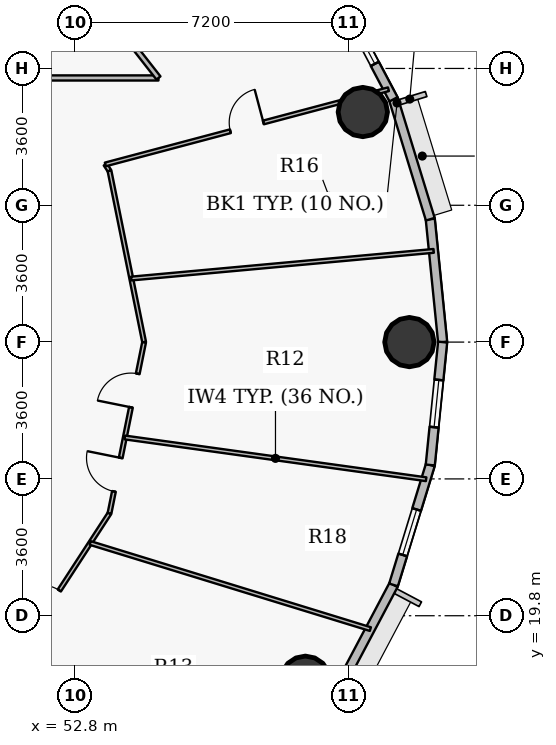
"""IFC4 building model, lengths in metres.
Left out: names, types, materials, properties, quantities, classifications, styles, units other than length and angle.
Written with IfcOpenShell. Run it as: python <this file> out.ifc"""

import sys

from ifc_helpers import new_model, si_unit, direction, frame, frame_2d, origin, origin_2d, place, context, subcontext, project, spatial, rectangle, hollow_circle, extrude, source, transform, mapped, element, fill, save


model = new_model("IFC4")
c1 = context("Model", 3, precision=1e-05, world=origin(), true_north=direction((0.0, 1.0)))
c2 = subcontext(c1, "Body", "Model", "MODEL_VIEW")
j1 = project(units=[si_unit("LENGTHUNIT", "METRE"), si_unit("PLANEANGLEUNIT", "RADIAN")], contexts=[c1])
p1 = place(None, origin())
s1 = spatial("IfcSite", under=j1, at=p1, CompositionType="ELEMENT")
p2 = place(p1, origin())
s2 = spatial("IfcBuilding", under=s1, at=p2, CompositionType="ELEMENT")
p3 = place(p2, frame((0.0, 0.0, 186.15)))
s3 = spatial("IfcBuildingStorey", under=s2, at=p3, CompositionType="ELEMENT", Elevation=186.15)
for number, where, z_axis, x_axis in (
    (1, (61.6, 27.0, 0.0), (0.0, 0.0, 1.0), (1.0, 0.0, 0.0)),
    (2, (60.375, 33.053, 0.0), (0.0, 0.0, 1.0), (1.0, 0.0, 0.0)),
    (3, (58.863, 18.089, 0.0), (0.0, 0.0, 1.0), (1.0, 0.0, 0.0)),
):
    element("IfcColumn", number, at=place(p3, frame(where, z_axis=z_axis, x_axis=x_axis)), inside=s3, PredefinedType="COLUMN", context=c2, shape_type="SweptSolid", body=[
        extrude(hollow_circle(Radius=0.65, WallThickness=0.04, at=origin_2d()), origin(), (0.0, 0.0, 1.0), 3.75),
    ])
p4 = place(p3, frame((62.15, 30.234, 0.0), z_axis=(0.0, 0.0, 1.0), x_axis=(0.100061534614, -0.994981250723, 0.0)))
e4 = element("IfcWall", 4, at=p4, inside=s3, PredefinedType="SOLIDWALL", context=c2, shape_type="SweptSolid", body=[
    extrude(rectangle(XDim=3.25, YDim=0.24, at=frame_2d((1.625, 0.0))), origin(), (0.0, 0.0, 1.0), 3.5),
])
p5 = place(p3, frame((61.183, 33.389, 0.0), z_axis=(0.0, 0.0, 1.0), x_axis=(0.293097995113, -0.956082405058, 0.0)))
e5 = element("IfcWall", 5, at=p5, inside=s3, PredefinedType="SOLIDWALL", context=c2, shape_type="SweptSolid", body=[
    extrude(rectangle(XDim=3.3, YDim=0.24, at=frame_2d((1.65, 0.0))), origin(), (0.0, 0.0, 1.0), 3.5),
])
p6 = place(p3, frame((59.596, 36.388, 0.0), z_axis=(0.0, 0.0, 1.0), x_axis=(0.467586874938, -0.88394712194, 0.0)))
e6 = element("IfcWall", 6, at=p6, inside=s3, PredefinedType="SOLIDWALL", context=c2, shape_type="SweptSolid", body=[
    extrude(rectangle(XDim=3.393, YDim=0.24, at=frame_2d((1.697, 0.0))), origin(), (0.0, 0.0, 1.0), 3.5),
])
p7 = place(p6, frame((0.739, 0.0, 0.9)))
e7 = element("IfcOpeningElement", 7, at=p7, cuts=e6, PredefinedType="OPENING", context=c2, shape_type="SweptSolid", body=[
    extrude(rectangle(XDim=1.6, YDim=1.75, at=origin_2d()), frame((0.8, 0.13, 0.875), z_axis=(0.0, -1.0, 0.0), x_axis=(1.0, 0.0, 0.0)), (0.0, 0.0, 1.0), 0.26),
])
p8 = place(p3, frame((61.183, 20.611, 0.0), z_axis=(0.0, 0.0, 1.0), x_axis=(-0.467586874938, -0.88394712194, 0.0)))
e8 = element("IfcWall", 8, at=p8, inside=s3, PredefinedType="SOLIDWALL", context=c2, shape_type="SweptSolid", body=[
    extrude(rectangle(XDim=3.393, YDim=0.24, at=frame_2d((1.697, 0.0))), origin(), (0.0, 0.0, 1.0), 3.5),
])
p9 = place(p3, frame((62.15, 23.766, 0.0), z_axis=(0.0, 0.0, 1.0), x_axis=(-0.293097995113, -0.956082405058, 0.0)))
e9 = element("IfcWall", 9, at=p9, inside=s3, PredefinedType="SOLIDWALL", context=c2, shape_type="SweptSolid", body=[
    extrude(rectangle(XDim=3.3, YDim=0.24, at=frame_2d((1.65, 0.0))), origin(), (0.0, 0.0, 1.0), 3.5),
])
p10 = place(p9, frame((1.225, 0.0, 0.9)))
e10 = element("IfcOpeningElement", 10, at=p10, cuts=e9, PredefinedType="OPENING", context=c2, shape_type="SweptSolid", body=[
    extrude(rectangle(XDim=1.25, YDim=1.65, at=origin_2d()), frame((0.625, 0.13, 0.825), z_axis=(0.0, -1.0, 0.0), x_axis=(1.0, 0.0, 0.0)), (0.0, 0.0, 1.0), 0.26),
])
p11 = place(p3, frame((62.475, 27.0, 0.0), z_axis=(0.0, 0.0, 1.0), x_axis=(-0.100061534614, -0.994981250723, 0.0)))
e11 = element("IfcWall", 11, at=p11, inside=s3, PredefinedType="SOLIDWALL", context=c2, shape_type="SweptSolid", body=[
    extrude(rectangle(XDim=3.25, YDim=0.24, at=frame_2d((1.625, 0.0))), origin(), (0.0, 0.0, 1.0), 3.5),
])
p12 = place(p11, frame((1.0, 0.0, 0.9)))
e12 = element("IfcOpeningElement", 12, at=p12, cuts=e11, PredefinedType="OPENING", context=c2, shape_type="SweptSolid", body=[
    extrude(rectangle(XDim=1.25, YDim=1.65, at=origin_2d()), frame((0.625, 0.13, 0.825), z_axis=(0.0, -1.0, 0.0), x_axis=(1.0, 0.0, 0.0)), (0.0, 0.0, 1.0), 0.26),
])
p13 = place(p3, frame((45.8, 33.95, 0.0), z_axis=(0.0, 0.0, 1.0), x_axis=(1.0, 0.0, 0.0)))
e13 = element("IfcWall", 13, at=p13, inside=s3, PredefinedType="PARTITIONING", context=c2, shape_type="SweptSolid", body=[
    extrude(rectangle(XDim=9.197, YDim=0.135, at=frame_2d((4.599, 0.0))), origin(), (0.0, 0.0, 1.0), 3.185),
])
p14 = place(p13, frame((4.098, 0.0, 0.0)))
e14 = element("IfcOpeningElement", 14, at=p14, cuts=e13, PredefinedType="OPENING", context=c2, shape_type="SweptSolid", body=[
    extrude(rectangle(XDim=1.0, YDim=2.15, at=origin_2d()), frame((0.5, 0.078, 1.075), z_axis=(0.0, -1.0, 0.0), x_axis=(1.0, 0.0, 0.0)), (0.0, 0.0, 1.0), 0.155),
])
p15 = place(p3, frame((51.064, 18.429, 0.0), z_axis=(0.0, 0.0, 1.0), x_axis=(0.545382906853, 0.838187022634, 0.0)))
e15 = element("IfcWall", 15, at=p15, inside=s3, PredefinedType="PARTITIONING", context=c2, shape_type="SweptSolid", body=[
    extrude(rectangle(XDim=4.849, YDim=0.1, at=frame_2d((2.425, 0.0))), origin(), (0.0, 0.0, 1.0), 2.935),
])
p16 = place(p15, frame((1.529, 0.0, 0.0)))
e16 = element("IfcOpeningElement", 16, at=p16, cuts=e15, PredefinedType="OPENING", context=c2, shape_type="SweptSolid", body=[
    extrude(rectangle(XDim=0.9, YDim=2.1, at=origin_2d()), frame((0.45, 0.06, 1.05), z_axis=(0.0, -1.0, 0.0), x_axis=(1.0, 0.0, 0.0)), (0.0, 0.0, 1.0), 0.12),
])
p17 = place(p3, frame((53.201, 21.714, 0.0), z_axis=(0.0, 0.0, 1.0), x_axis=(0.955880247412, -0.293756621386, 0.0)))
e17 = element("IfcWall", 17, at=p17, inside=s3, PredefinedType="PARTITIONING", context=c2, shape_type="SweptSolid", body=[
    extrude(rectangle(XDim=7.713, YDim=0.1, at=frame_2d((3.856, 0.0))), origin(), (0.0, 0.0, 1.0), 2.935),
])
p18 = place(p3, frame((53.599, 31.674, 0.0), z_axis=(0.0, 0.0, 1.0), x_axis=(0.545415251213, -0.838165976251, 0.0)))
e18 = element("IfcWall", 18, at=p18, inside=s3, PredefinedType="PARTITIONING", context=c2, shape_type="SweptSolid", body=[
    extrude(rectangle(XDim=0.201, YDim=0.1, at=frame_2d((0.101, 0.0))), origin(), (0.0, 0.0, 1.0), 2.935),
])
p19 = place(p3, frame((53.599, 31.674, 0.0), z_axis=(0.0, 0.0, 1.0), x_axis=(0.966493108364, 0.256692562193, 0.0)))
e19 = element("IfcWall", 19, at=p19, inside=s3, PredefinedType="PARTITIONING", context=c2, shape_type="SweptSolid", body=[
    extrude(rectangle(XDim=7.708, YDim=0.1, at=frame_2d((3.854, 0.0))), origin(), (0.0, 0.0, 1.0), 2.935),
])
p20 = place(p19, frame((3.404, 0.0, 0.0)))
e20 = element("IfcOpeningElement", 20, at=p20, cuts=e19, PredefinedType="OPENING", context=c2, shape_type="SweptSolid", body=[
    extrude(rectangle(XDim=0.9, YDim=2.1, at=origin_2d()), frame((0.45, 0.06, 1.05), z_axis=(0.0, -1.0, 0.0), x_axis=(1.0, 0.0, 0.0)), (0.0, 0.0, 1.0), 0.12),
])
p21 = place(p3, frame((53.653, 35.667, 0.0), z_axis=(0.0, 0.0, 1.0), x_axis=(0.616302223209, -0.787509726713, 0.0)))
e21 = element("IfcWall", 21, at=p21, inside=s3, PredefinedType="PARTITIONING", context=c2, shape_type="SweptSolid", body=[
    extrude(rectangle(XDim=2.18, YDim=0.135, at=frame_2d((1.09, 0.0))), origin(), (0.0, 0.0, 1.0), 3.5),
])
p22 = place(p3, frame((53.709, 22.494, 0.0), z_axis=(0.0, 0.0, 1.0), x_axis=(0.19825018224, 0.980151450155, 0.0)))
e22 = element("IfcWall", 22, at=p22, inside=s3, PredefinedType="PARTITIONING", context=c2, shape_type="SweptSolid", body=[
    extrude(rectangle(XDim=4.597, YDim=0.1, at=frame_2d((2.299, 0.0))), origin(), (0.0, 0.0, 1.0), 2.935),
])
p23 = place(p22, frame((0.588, 0.0, 0.0)))
e23 = element("IfcOpeningElement", 23, at=p23, cuts=e22, PredefinedType="OPENING", context=c2, shape_type="SweptSolid", body=[
    extrude(rectangle(XDim=0.9, YDim=2.1, at=origin_2d()), frame((0.45, 0.06, 1.05), z_axis=(0.0, -1.0, 0.0), x_axis=(1.0, 0.0, 0.0)), (0.0, 0.0, 1.0), 0.12),
])
p24 = place(p22, frame((2.847, 0.0, 0.0)))
e24 = element("IfcOpeningElement", 24, at=p24, cuts=e22, PredefinedType="OPENING", context=c2, shape_type="SweptSolid", body=[
    extrude(rectangle(XDim=0.9, YDim=2.1, at=origin_2d()), frame((0.45, 0.06, 1.05), z_axis=(0.0, -1.0, 0.0), x_axis=(1.0, 0.0, 0.0)), (0.0, 0.0, 1.0), 0.12),
])
p25 = place(p3, frame((53.709, 31.506, 0.0), z_axis=(0.0, 0.0, 1.0), x_axis=(0.198209478932, -0.980159682124, 0.0)))
e25 = element("IfcWall", 25, at=p25, inside=s3, PredefinedType="PARTITIONING", context=c2, shape_type="SweptSolid", body=[
    extrude(rectangle(XDim=4.597, YDim=0.1, at=frame_2d((2.298, 0.0))), origin(), (0.0, 0.0, 1.0), 2.935),
])
p26 = place(p3, frame((54.112, 24.49, 0.0), z_axis=(0.0, 0.0, 1.0), x_axis=(0.990538514902, -0.137235019202, 0.0)))
e26 = element("IfcWall", 26, at=p26, inside=s3, PredefinedType="PARTITIONING", context=c2, shape_type="SweptSolid", body=[
    extrude(rectangle(XDim=8.004, YDim=0.1, at=frame_2d((4.002, 0.0))), origin(), (0.0, 0.0, 1.0), 2.935),
])
p27 = place(p3, frame((54.282, 28.672, 0.0), z_axis=(0.0, 0.0, 1.0), x_axis=(0.995843216122, 0.091083966227, 0.0)))
e27 = element("IfcWall", 27, at=p27, inside=s3, PredefinedType="PARTITIONING", context=c2, shape_type="SweptSolid", body=[
    extrude(rectangle(XDim=7.99, YDim=0.1, at=frame_2d((3.995, 0.0))), origin(), (0.0, 0.0, 1.0), 2.935),
])
m1 = source(origin(), c2, "Body", "SweptSolid", [
    extrude(rectangle(XDim=1.6, YDim=1.75, at=origin_2d()), frame((0.8, 0.03, 0.875), z_axis=(0.0, -1.0, 0.0), x_axis=(1.0, 0.0, 0.0)), (0.0, 0.0, 1.0), 0.06),
])
p28 = place(p7, origin())
e28 = element("IfcWindow", 28, at=p28, inside=s3, PartitioningType="DOUBLE_PANEL_VERTICAL", PredefinedType="WINDOW", context=c2, shape_type="MappedRepresentation", body=[
    mapped(m1, transform((0.0, 0.0, 0.0), x_axis=(1.0, 0.0, 0.0), y_axis=(0.0, 1.0, 0.0), z_axis=(0.0, 0.0, 1.0), scale=1.0)),
])
fill(e7, e28)
m2 = source(origin(), c2, "Body", "SweptSolid", [
    extrude(rectangle(XDim=1.25, YDim=1.65, at=origin_2d()), frame((0.625, 0.03, 0.825), z_axis=(0.0, -1.0, 0.0), x_axis=(1.0, 0.0, 0.0)), (0.0, 0.0, 1.0), 0.06),
])
p29 = place(p10, origin())
e29 = element("IfcWindow", 29, at=p29, inside=s3, PartitioningType="SINGLE_PANEL", PredefinedType="WINDOW", context=c2, shape_type="MappedRepresentation", body=[
    mapped(m2, transform((0.0, 0.0, 0.0), x_axis=(1.0, 0.0, 0.0), y_axis=(0.0, 1.0, 0.0), z_axis=(0.0, 0.0, 1.0), scale=1.0)),
])
fill(e10, e29)
p30 = place(p12, origin())
e30 = element("IfcWindow", 30, at=p30, inside=s3, PartitioningType="SINGLE_PANEL", PredefinedType="WINDOW", context=c2, shape_type="MappedRepresentation", body=[
    mapped(m2, transform((0.0, 0.0, 0.0), x_axis=(1.0, 0.0, 0.0), y_axis=(0.0, 1.0, 0.0), z_axis=(0.0, 0.0, 1.0), scale=1.0)),
])
fill(e12, e30)
m3 = source(origin(), c2, "Body", "SweptSolid", [
    extrude(rectangle(XDim=0.9, YDim=2.1, at=origin_2d()), frame((0.45, 0.025, 1.05), z_axis=(0.0, -1.0, 0.0), x_axis=(1.0, 0.0, 0.0)), (0.0, 0.0, 1.0), 0.05),
])
p31 = place(p16, origin())
e31 = element("IfcDoor", 31, at=p31, inside=s3, OperationType="SINGLE_SWING_LEFT", PredefinedType="DOOR", context=c2, shape_type="MappedRepresentation", body=[
    mapped(m3, transform((0.0, 0.0, 0.0), x_axis=(1.0, 0.0, 0.0), y_axis=(0.0, 1.0, 0.0), z_axis=(0.0, 0.0, 1.0), scale=1.0)),
])
fill(e16, e31)
p32 = place(p23, origin())
e32 = element("IfcDoor", 32, at=p32, inside=s3, OperationType="SINGLE_SWING_RIGHT", PredefinedType="DOOR", context=c2, shape_type="MappedRepresentation", body=[
    mapped(m3, transform((0.0, 0.0, 0.0), x_axis=(1.0, 0.0, 0.0), y_axis=(0.0, 1.0, 0.0), z_axis=(0.0, 0.0, 1.0), scale=1.0)),
])
fill(e23, e32)
p33 = place(p24, origin())
e33 = element("IfcDoor", 33, at=p33, inside=s3, OperationType="SINGLE_SWING_LEFT", PredefinedType="DOOR", context=c2, shape_type="MappedRepresentation", body=[
    mapped(m3, transform((0.0, 0.0, 0.0), x_axis=(1.0, 0.0, 0.0), y_axis=(0.0, 1.0, 0.0), z_axis=(0.0, 0.0, 1.0), scale=1.0)),
])
fill(e24, e33)
p34 = place(p20, origin())
e34 = element("IfcDoor", 34, at=p34, inside=s3, OperationType="SINGLE_SWING_RIGHT", PredefinedType="DOOR", context=c2, shape_type="MappedRepresentation", body=[
    mapped(m3, transform((0.0, 0.0, 0.0), x_axis=(1.0, 0.0, 0.0), y_axis=(0.0, 1.0, 0.0), z_axis=(0.0, 0.0, 1.0), scale=1.0)),
])
fill(e20, e34)
save(model, sys.argv[1])
